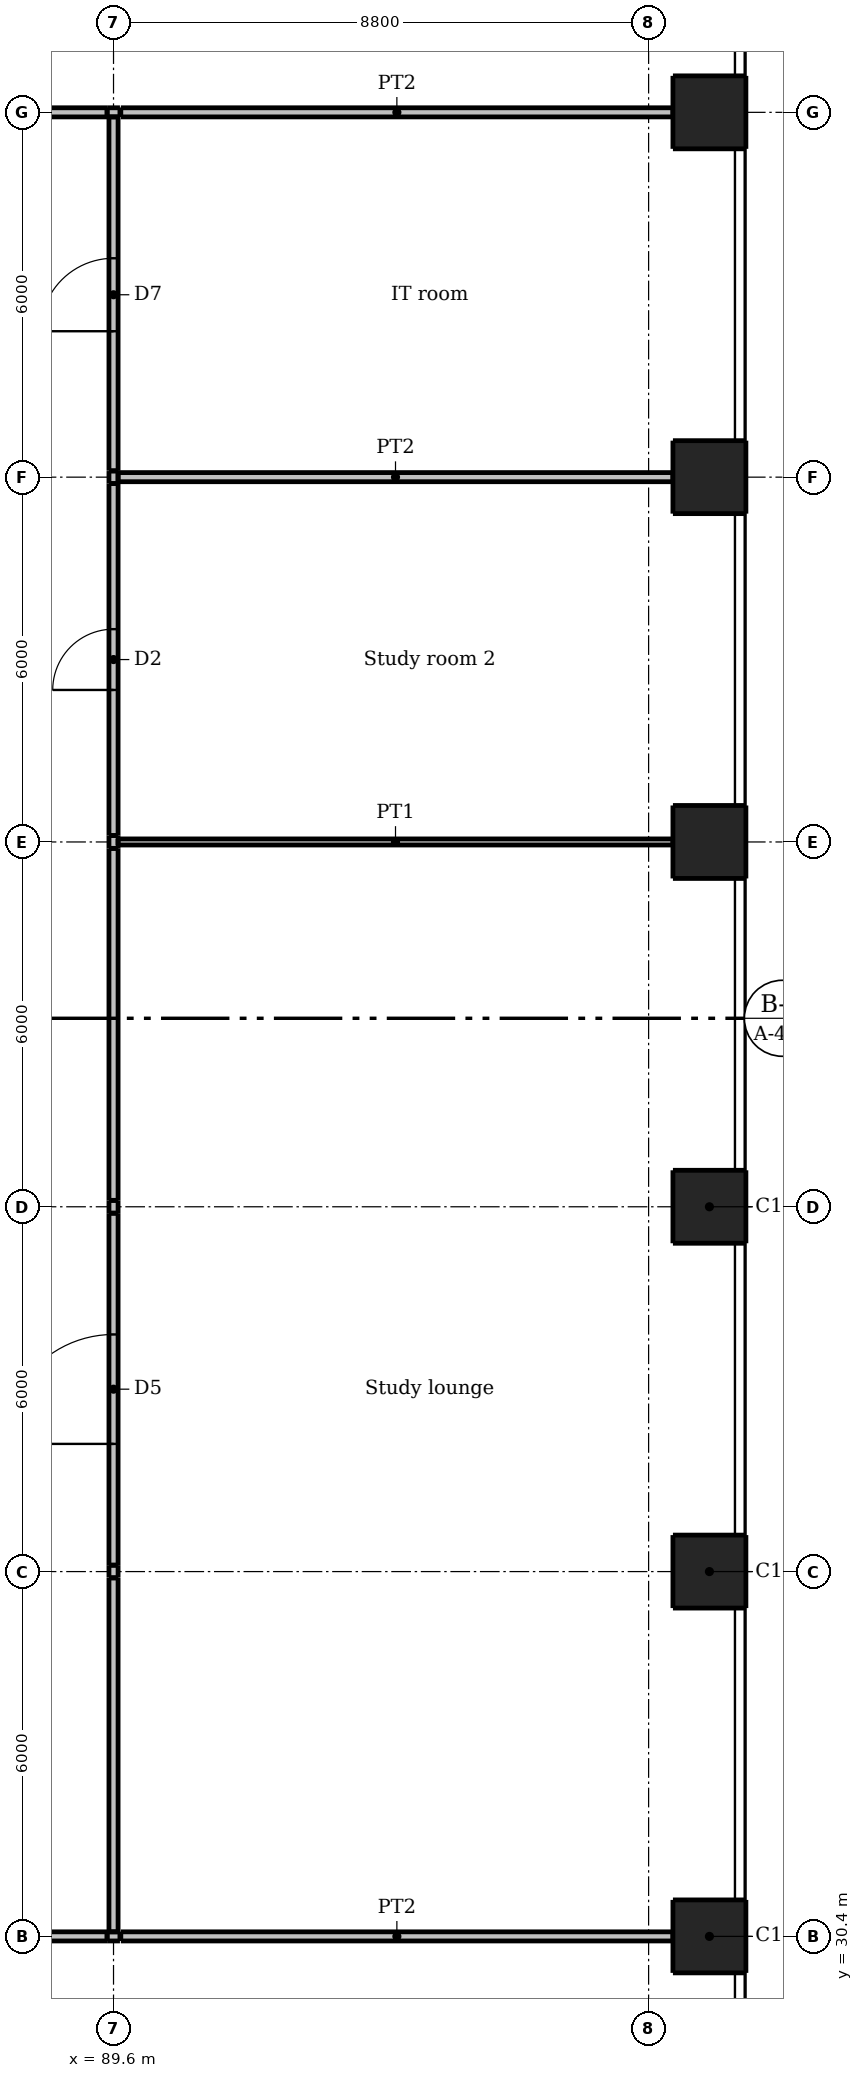
"""IFC4 building model, lengths in metres.
Left out: names, types, materials, properties, quantities, classifications, styles, units other than length and angle.
Written with IfcOpenShell. Run it as: python <this file> out.ifc"""

import sys

from ifc_helpers import new_model, si_unit, direction, frame, frame_2d, origin, origin_2d, place, context, subcontext, project, spatial, rectangle, extrude, element, fill, save


model = new_model("IFC4")
c1 = context("Model", 3, precision=1e-05, world=origin(), true_north=direction((0.0, 1.0)))
c2 = subcontext(c1, "Body", "Model", "MODEL_VIEW")
j1 = project(units=[si_unit("LENGTHUNIT", "METRE"), si_unit("PLANEANGLEUNIT", "RADIAN")], contexts=[c1])
p1 = place(None, origin())
s1 = spatial("IfcSite", under=j1, at=p1, CompositionType="ELEMENT")
p2 = place(p1, origin())
s2 = spatial("IfcBuilding", under=s1, at=p2, CompositionType="ELEMENT")
p3 = place(p2, frame((0.0, 0.0, 14.5)))
s3 = spatial("IfcBuildingStorey", under=s2, at=p3, CompositionType="ELEMENT", Elevation=14.5)
for number, where, z_axis, x_axis in (
    (1, (99.4, 30.4, 0.0), (0.0, 0.0, 1.0), (1.0, 0.0, 0.0)),
    (2, (99.4, 36.4, 0.0), (0.0, 0.0, 1.0), (1.0, 0.0, 0.0)),
    (3, (99.4, 42.4, 0.0), (0.0, 0.0, 1.0), (1.0, 0.0, 0.0)),
    (4, (99.4, 48.4, 0.0), (0.0, 0.0, 1.0), (1.0, 0.0, 0.0)),
    (5, (99.4, 54.4, 0.0), (0.0, 0.0, 1.0), (1.0, 0.0, 0.0)),
    (6, (99.4, 60.4, 0.0), (0.0, 0.0, 1.0), (1.0, 0.0, 0.0)),
):
    element("IfcColumn", number, at=place(p3, frame(where, z_axis=z_axis, x_axis=x_axis)), inside=s3, PredefinedType="COLUMN", context=c2, shape_type="SweptSolid", body=[
        extrude(rectangle(XDim=1.2, YDim=1.2, at=origin_2d()), origin(), (0.0, 0.0, 1.0), 4.2),
    ])
p4 = place(p3, frame((83.705, 30.4, 0.0), z_axis=(0.0, 0.0, 1.0), x_axis=(1.0, 0.0, 0.0)))
e7 = element("IfcWall", 7, at=p4, inside=s3, PredefinedType="PARTITIONING", context=c2, shape_type="SweptSolid", body=[
    extrude(rectangle(XDim=5.789, YDim=0.15, at=frame_2d((2.895, 0.0))), origin(), (0.0, 0.0, 1.0), 4.2),
])
p5 = place(p4, frame((2.395, 0.0, 0.0)))
e8 = element("IfcOpeningElement", 8, at=p5, cuts=e7, PredefinedType="OPENING", context=c2, shape_type="SweptSolid", body=[
    extrude(rectangle(XDim=1.0, YDim=2.1, at=frame_2d((0.5, 1.05))), frame((0.0, 0.085, 0.0), z_axis=(0.0, -1.0, 0.0), x_axis=(1.0, 0.0, 0.0)), (0.0, 0.0, 1.0), 0.17),
])
p6 = place(p3, frame((89.495, 30.4, 0.0), z_axis=(0.0, 0.0, 1.0), x_axis=(1.0, 0.0, 0.0)))
e9 = element("IfcWall", 9, at=p6, inside=s3, PredefinedType="PARTITIONING", context=c2, shape_type="SweptSolid", body=[
    extrude(rectangle(XDim=0.211, YDim=0.15, at=frame_2d((0.105, 0.0))), origin(), (0.0, 0.0, 1.0), 3.661),
])
p7 = place(p3, frame((89.72, 30.4, 0.0), z_axis=(0.0, 0.0, 1.0), x_axis=(1.0, 0.0, 0.0)))
e10 = element("IfcWall", 10, at=p7, inside=s3, PredefinedType="PARTITIONING", context=c2, shape_type="SweptSolid", body=[
    extrude(rectangle(XDim=9.08, YDim=0.15, at=frame_2d((4.54, 0.0))), origin(), (0.0, 0.0, 1.0), 3.667),
])
p8 = place(p3, frame((89.675, 48.4, 0.0), z_axis=(0.0, 0.0, 1.0), x_axis=(1.0, 0.0, 0.0)))
e11 = element("IfcWall", 11, at=p8, inside=s3, PredefinedType="PARTITIONING", context=c2, shape_type="SweptSolid", body=[
    extrude(rectangle(XDim=9.125, YDim=0.1, at=frame_2d((4.562, 0.0))), origin(), (0.0, 0.0, 1.0), 3.661),
])
p9 = place(p3, frame((89.675, 54.4, 0.0), z_axis=(0.0, 0.0, 1.0), x_axis=(1.0, 0.0, 0.0)))
e12 = element("IfcWall", 12, at=p9, inside=s3, PredefinedType="PARTITIONING", context=c2, shape_type="SweptSolid", body=[
    extrude(rectangle(XDim=9.125, YDim=0.15, at=frame_2d((4.562, 0.0))), origin(), (0.0, 0.0, 1.0), 3.661),
])
p10 = place(p3, frame((83.705, 60.4, 0.0), z_axis=(0.0, 0.0, 1.0), x_axis=(1.0, 0.0, 0.0)))
e13 = element("IfcWall", 13, at=p10, inside=s3, PredefinedType="PARTITIONING", context=c2, shape_type="SweptSolid", body=[
    extrude(rectangle(XDim=5.79, YDim=0.15, at=frame_2d((2.895, 0.0))), origin(), (0.0, 0.0, 1.0), 4.2),
])
p11 = place(p10, frame((2.395, 0.0, 0.0)))
e14 = element("IfcOpeningElement", 14, at=p11, cuts=e13, PredefinedType="OPENING", context=c2, shape_type="SweptSolid", body=[
    extrude(rectangle(XDim=1.0, YDim=2.1, at=frame_2d((0.5, 1.05))), frame((0.0, 0.085, 0.0), z_axis=(0.0, -1.0, 0.0), x_axis=(1.0, 0.0, 0.0)), (0.0, 0.0, 1.0), 0.17),
])
p12 = place(p3, frame((89.495, 60.4, 0.0), z_axis=(0.0, 0.0, 1.0), x_axis=(1.0, 0.0, 0.0)))
e15 = element("IfcWall", 15, at=p12, inside=s3, PredefinedType="PARTITIONING", context=c2, shape_type="SweptSolid", body=[
    extrude(rectangle(XDim=0.211, YDim=0.15, at=frame_2d((0.105, 0.0))), origin(), (0.0, 0.0, 1.0), 3.661),
])
p13 = place(p3, frame((89.72, 60.4, 0.0), z_axis=(0.0, 0.0, 1.0), x_axis=(1.0, 0.0, 0.0)))
e16 = element("IfcWall", 16, at=p13, inside=s3, PredefinedType="PARTITIONING", context=c2, shape_type="SweptSolid", body=[
    extrude(rectangle(XDim=9.08, YDim=0.15, at=frame_2d((4.54, 0.0))), origin(), (0.0, 0.0, 1.0), 3.667),
])
p14 = place(p3, frame((89.6, 30.475, 0.0), z_axis=(0.0, 0.0, 1.0), x_axis=(0.0, 1.0, 0.0)))
e17 = element("IfcWall", 17, at=p14, inside=s3, PredefinedType="PARTITIONING", context=c2, shape_type="SweptSolid", body=[
    extrude(rectangle(XDim=5.82, YDim=0.15, at=frame_2d((2.91, 0.0))), origin(), (0.0, 0.0, 1.0), 3.661),
])
p15 = place(p3, frame((89.6, 36.3, 0.0), z_axis=(0.0, 0.0, 1.0), x_axis=(0.0, 1.0, 0.0)))
e18 = element("IfcWall", 18, at=p15, inside=s3, PredefinedType="PARTITIONING", context=c2, shape_type="SweptSolid", body=[
    extrude(rectangle(XDim=0.206, YDim=0.15, at=frame_2d((0.103, 0.0))), origin(), (0.0, 0.0, 1.0), 3.661),
])
p16 = place(p3, frame((89.6, 36.505, 0.0), z_axis=(0.0, 0.0, 1.0), x_axis=(0.0, 1.0, 0.0)))
e19 = element("IfcWall", 19, at=p16, inside=s3, PredefinedType="PARTITIONING", context=c2, shape_type="SweptSolid", body=[
    extrude(rectangle(XDim=5.789, YDim=0.15, at=frame_2d((2.895, 0.0))), origin(), (0.0, 0.0, 1.0), 4.2),
])
p17 = place(p16, frame((1.995, 0.0, 0.0)))
e20 = element("IfcOpeningElement", 20, at=p17, cuts=e19, PredefinedType="OPENING", context=c2, shape_type="SweptSolid", body=[
    extrude(rectangle(XDim=1.8, YDim=2.1, at=frame_2d((0.9, 1.05))), frame((0.0, 0.085, 0.0), z_axis=(0.0, -1.0, 0.0), x_axis=(1.0, 0.0, 0.0)), (0.0, 0.0, 1.0), 0.17),
])
p18 = place(p3, frame((89.6, 42.295, 0.0), z_axis=(0.0, 0.0, 1.0), x_axis=(0.0, 1.0, 0.0)))
e21 = element("IfcWall", 21, at=p18, inside=s3, PredefinedType="PARTITIONING", context=c2, shape_type="SweptSolid", body=[
    extrude(rectangle(XDim=0.211, YDim=0.15, at=frame_2d((0.105, 0.0))), origin(), (0.0, 0.0, 1.0), 3.661),
])
p19 = place(p3, frame((89.6, 42.505, 0.0), z_axis=(0.0, 0.0, 1.0), x_axis=(0.0, 1.0, 0.0)))
e22 = element("IfcWall", 22, at=p19, inside=s3, PredefinedType="PARTITIONING", context=c2, shape_type="SweptSolid", body=[
    extrude(rectangle(XDim=5.789, YDim=0.15, at=frame_2d((2.895, 0.0))), origin(), (0.0, 0.0, 1.0), 4.2),
])
p20 = place(p3, frame((89.6, 48.295, 0.0), z_axis=(0.0, 0.0, 1.0), x_axis=(0.0, 1.0, 0.0)))
e23 = element("IfcWall", 23, at=p20, inside=s3, PredefinedType="PARTITIONING", context=c2, shape_type="SweptSolid", body=[
    extrude(rectangle(XDim=0.211, YDim=0.15, at=frame_2d((0.105, 0.0))), origin(), (0.0, 0.0, 1.0), 3.661),
])
p21 = place(p3, frame((89.6, 48.505, 0.0), z_axis=(0.0, 0.0, 1.0), x_axis=(0.0, 1.0, 0.0)))
e24 = element("IfcWall", 24, at=p21, inside=s3, PredefinedType="PARTITIONING", context=c2, shape_type="SweptSolid", body=[
    extrude(rectangle(XDim=5.789, YDim=0.15, at=frame_2d((2.895, 0.0))), origin(), (0.0, 0.0, 1.0), 4.2),
])
p22 = place(p21, frame((2.395, 0.0, 0.0)))
e25 = element("IfcOpeningElement", 25, at=p22, cuts=e24, PredefinedType="OPENING", context=c2, shape_type="SweptSolid", body=[
    extrude(rectangle(XDim=1.0, YDim=2.1, at=frame_2d((0.5, 1.05))), frame((0.0, 0.085, 0.0), z_axis=(0.0, -1.0, 0.0), x_axis=(1.0, 0.0, 0.0)), (0.0, 0.0, 1.0), 0.17),
])
p23 = place(p3, frame((89.6, 54.295, 0.0), z_axis=(0.0, 0.0, 1.0), x_axis=(0.0, 1.0, 0.0)))
e26 = element("IfcWall", 26, at=p23, inside=s3, PredefinedType="PARTITIONING", context=c2, shape_type="SweptSolid", body=[
    extrude(rectangle(XDim=0.206, YDim=0.15, at=frame_2d((0.103, 0.0))), origin(), (0.0, 0.0, 1.0), 3.661),
])
p24 = place(p3, frame((89.6, 54.505, 0.0), z_axis=(0.0, 0.0, 1.0), x_axis=(0.0, 1.0, 0.0)))
e27 = element("IfcWall", 27, at=p24, inside=s3, PredefinedType="PARTITIONING", context=c2, shape_type="SweptSolid", body=[
    extrude(rectangle(XDim=5.82, YDim=0.15, at=frame_2d((2.91, 0.0))), origin(), (0.0, 0.0, 1.0), 3.661),
])
p25 = place(p24, frame((2.295, 0.0, 0.0)))
e28 = element("IfcOpeningElement", 28, at=p25, cuts=e27, PredefinedType="OPENING", context=c2, shape_type="SweptSolid", body=[
    extrude(rectangle(XDim=1.2, YDim=2.1, at=frame_2d((0.6, 1.05))), frame((0.0, 0.085, 0.0), z_axis=(0.0, -1.0, 0.0), x_axis=(1.0, 0.0, 0.0)), (0.0, 0.0, 1.0), 0.17),
])
p26 = place(p17, origin())
e29 = element("IfcDoor", 29, at=p26, inside=s3, OperationType="DOUBLE_DOOR_SINGLE_SWING", PredefinedType="DOOR", context=c2, shape_type="SweptSolid", body=[
    extrude(rectangle(XDim=1.8, YDim=2.1, at=frame_2d((0.9, 1.05))), frame((0.0, 0.025, 0.0), z_axis=(0.0, -1.0, 0.0), x_axis=(1.0, 0.0, 0.0)), (0.0, 0.0, 1.0), 0.05),
])
fill(e20, e29)
p27 = place(p22, origin())
e30 = element("IfcDoor", 30, at=p27, inside=s3, OperationType="SINGLE_SWING_LEFT", PredefinedType="DOOR", context=c2, shape_type="SweptSolid", body=[
    extrude(rectangle(XDim=1.0, YDim=2.1, at=frame_2d((0.5, 1.05))), frame((0.0, 0.025, 0.0), z_axis=(0.0, -1.0, 0.0), x_axis=(1.0, 0.0, 0.0)), (0.0, 0.0, 1.0), 0.05),
])
fill(e25, e30)
p28 = place(p25, origin())
e31 = element("IfcDoor", 31, at=p28, inside=s3, OperationType="SINGLE_SWING_LEFT", PredefinedType="DOOR", context=c2, shape_type="SweptSolid", body=[
    extrude(rectangle(XDim=1.2, YDim=2.1, at=frame_2d((0.6, 1.05))), frame((0.0, 0.025, 0.0), z_axis=(0.0, -1.0, 0.0), x_axis=(1.0, 0.0, 0.0)), (0.0, 0.0, 1.0), 0.05),
])
fill(e28, e31)
save(model, sys.argv[1])
